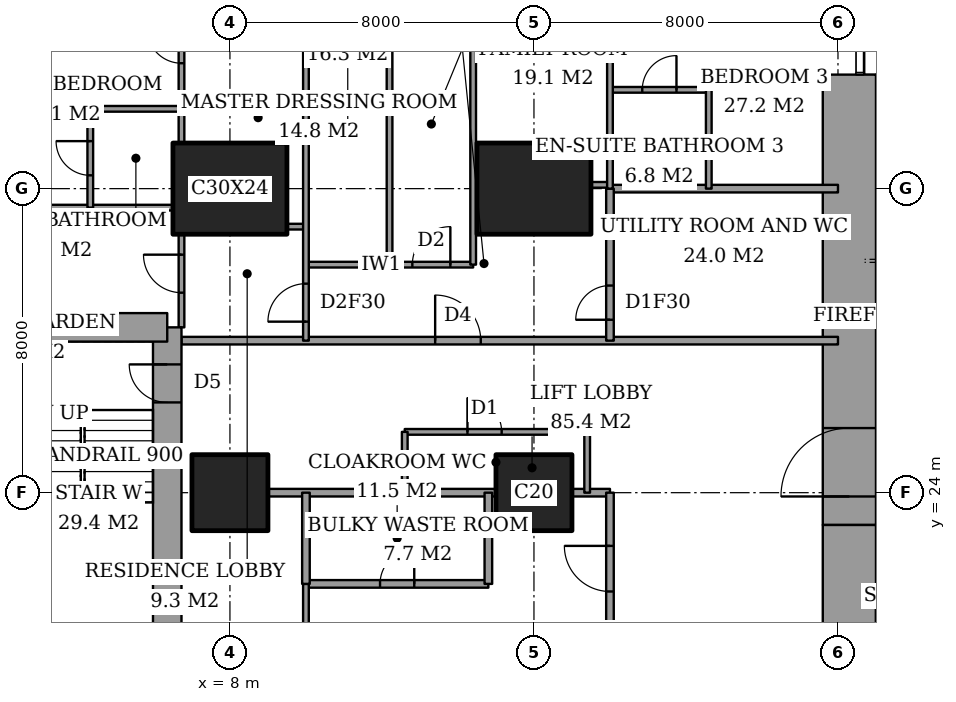
"""IFC4 building model, lengths in metres.
Left out: names, types, materials, properties, quantities, classifications, styles, units other than length and angle.
Written with IfcOpenShell. Run it as: python <this file> out.ifc"""

import sys

from ifc_helpers import new_model, si_unit, direction, frame, frame_2d, origin, origin_2d, place, context, subcontext, project, spatial, rectangle, extrude, element, fill, save


model = new_model("IFC4")
c1 = context("Model", 3, precision=1e-05, world=origin(), true_north=direction((0.0, 1.0)))
c2 = subcontext(c1, "Body", "Model", "MODEL_VIEW")
j1 = project(units=[si_unit("LENGTHUNIT", "METRE"), si_unit("PLANEANGLEUNIT", "RADIAN")], contexts=[c1])
p1 = place(None, origin())
s1 = spatial("IfcSite", under=j1, at=p1, CompositionType="ELEMENT")
p2 = place(p1, origin())
s2 = spatial("IfcBuilding", under=s1, at=p2, CompositionType="ELEMENT")
p3 = place(p2, frame((0.0, 0.0, 157.4)))
s3 = spatial("IfcBuildingStorey", under=s2, at=p3, CompositionType="ELEMENT", Elevation=157.4)
p4 = place(p3, frame((8.0, 24.0, 0.0), z_axis=(0.0, 0.0, 1.0), x_axis=(1.0, 0.0, 0.0)))
e1 = element("IfcColumn", 1, at=p4, inside=s3, PredefinedType="COLUMN", context=c2, shape_type="SweptSolid", body=[
    extrude(rectangle(XDim=2.0, YDim=2.0, at=origin_2d()), origin(), (0.0, 0.0, 1.0), 3.6),
])
p5 = place(p3, frame((8.0, 32.0, 0.0), z_axis=(0.0, 0.0, 1.0), x_axis=(1.0, 0.0, 0.0)))
e2 = element("IfcColumn", 2, at=p5, inside=s3, PredefinedType="COLUMN", context=c2, shape_type="SweptSolid", body=[
    extrude(rectangle(XDim=3.0, YDim=2.4, at=origin_2d()), origin(), (0.0, 0.0, 1.0), 3.6),
])
p6 = place(p3, frame((16.0, 24.0, 0.0), z_axis=(0.0, 0.0, 1.0), x_axis=(1.0, 0.0, 0.0)))
e3 = element("IfcColumn", 3, at=p6, inside=s3, PredefinedType="COLUMN", context=c2, shape_type="SweptSolid", body=[
    extrude(rectangle(XDim=2.0, YDim=2.0, at=origin_2d()), origin(), (0.0, 0.0, 1.0), 3.6),
])
p7 = place(p3, frame((16.0, 32.0, 0.0), z_axis=(0.0, 0.0, 1.0), x_axis=(1.0, 0.0, 0.0)))
e4 = element("IfcColumn", 4, at=p7, inside=s3, PredefinedType="COLUMN", context=c2, shape_type="SweptSolid", body=[
    extrude(rectangle(XDim=3.0, YDim=2.4, at=origin_2d()), origin(), (0.0, 0.0, 1.0), 3.6),
])
p8 = place(p3, frame((24.3, 13.0, 0.0), z_axis=(0.0, 0.0, 1.0), x_axis=(0.0, 1.0, 0.0)))
e5 = element("IfcWall", 5, at=p8, inside=s3, PredefinedType="SHEAR", context=c2, shape_type="SweptSolid", body=[
    extrude(rectangle(XDim=10.15, YDim=1.4, at=frame_2d((5.075, 0.0))), origin(), (0.0, 0.0, 1.0), 3.6),
])
p9 = place(p3, frame((24.3, 23.15, 0.0), z_axis=(0.0, 0.0, 1.0), x_axis=(0.0, 1.0, 0.0)))
e6 = element("IfcWall", 6, at=p9, inside=s3, PredefinedType="SHEAR", context=c2, shape_type="SweptSolid", body=[
    extrude(rectangle(XDim=11.85, YDim=1.4, at=frame_2d((5.925, 0.0))), origin(), (0.0, 0.0, 1.0), 3.6),
])
p10 = place(p9, frame((0.75, 0.0, 0.0)))
e7 = element("IfcOpeningElement", 7, at=p10, cuts=e6, PredefinedType="OPENING", context=c2, shape_type="SweptSolid", body=[
    extrude(rectangle(XDim=1.8, YDim=2.4, at=frame_2d((0.9, 1.2))), frame((0.0, 0.71, 0.0), z_axis=(0.0, -1.0, 0.0), x_axis=(1.0, 0.0, 0.0)), (0.0, 0.0, 1.0), 1.42),
])
p11 = place(p3, frame((6.35, 19.65, 0.0), z_axis=(0.0, 0.0, 1.0), x_axis=(0.0, 1.0, 0.0)))
e8 = element("IfcWall", 8, at=p11, inside=s3, PredefinedType="SHEAR", context=c2, shape_type="SweptSolid", body=[
    extrude(rectangle(XDim=8.7, YDim=0.75, at=frame_2d((4.35, 0.0))), origin(), (0.0, 0.0, 1.0), 3.6),
])
p12 = place(p11, frame((6.725, 0.0, 0.0)))
e9 = element("IfcOpeningElement", 9, at=p12, cuts=e8, PredefinedType="OPENING", context=c2, shape_type="SweptSolid", body=[
    extrude(rectangle(XDim=1.0, YDim=2.1, at=frame_2d((0.5, 1.05))), frame((0.0, 0.385, 0.0), z_axis=(0.0, -1.0, 0.0), x_axis=(1.0, 0.0, 0.0)), (0.0, 0.0, 1.0), 0.77),
])
p13 = place(p3, frame((6.35, 28.35, 0.0), z_axis=(0.0, 0.0, 1.0), x_axis=(-1.0, 0.0, 0.0)))
e10 = element("IfcWall", 10, at=p13, inside=s3, PredefinedType="SHEAR", context=c2, shape_type="SweptSolid", body=[
    extrude(rectangle(XDim=4.45, YDim=0.75, at=frame_2d((2.225, 0.0))), origin(), (0.0, 0.0, 1.0), 3.6),
])
p14 = place(p3, frame((10.0, 21.6, 0.0), z_axis=(0.0, 0.0, 1.0), x_axis=(1.0, 0.0, 0.0)))
e11 = element("IfcWall", 11, at=p14, inside=s3, PredefinedType="PARTITIONING", context=c2, shape_type="SweptSolid", body=[
    extrude(rectangle(XDim=4.8, YDim=0.2, at=frame_2d((2.4, 0.0))), origin(), (0.0, 0.0, 1.0), 3.35),
])
p15 = place(p14, frame((1.95, 0.0, 0.0)))
e12 = element("IfcOpeningElement", 12, at=p15, cuts=e11, PredefinedType="OPENING", context=c2, shape_type="SweptSolid", body=[
    extrude(rectangle(XDim=0.9, YDim=2.1, at=frame_2d((0.45, 1.05))), frame((0.0, 0.11, 0.0), z_axis=(0.0, -1.0, 0.0), x_axis=(1.0, 0.0, 0.0)), (0.0, 0.0, 1.0), 0.22),
])
p16 = place(p3, frame((9.0, 24.0, 0.0), z_axis=(0.0, 0.0, 1.0), x_axis=(1.0, 0.0, 0.0)))
e13 = element("IfcWall", 13, at=p16, inside=s3, PredefinedType="PARTITIONING", context=c2, shape_type="SweptSolid", body=[
    extrude(rectangle(XDim=6.0, YDim=0.2, at=frame_2d((3.0, 0.0))), origin(), (0.0, 0.0, 1.0), 3.35),
])
p17 = place(p3, frame((17.0, 24.0, 0.0), z_axis=(0.0, 0.0, 1.0), x_axis=(1.0, 0.0, 0.0)))
e14 = element("IfcWall", 14, at=p17, inside=s3, PredefinedType="PARTITIONING", context=c2, shape_type="SweptSolid", body=[
    extrude(rectangle(XDim=1.0, YDim=0.2, at=frame_2d((0.5, 0.0))), origin(), (0.0, 0.0, 1.0), 3.35),
])
p18 = place(p3, frame((12.6, 25.6, 0.0), z_axis=(0.0, 0.0, 1.0), x_axis=(1.0, 0.0, 0.0)))
e15 = element("IfcWall", 15, at=p18, inside=s3, PredefinedType="PARTITIONING", context=c2, shape_type="SweptSolid", body=[
    extrude(rectangle(XDim=4.8, YDim=0.15, at=frame_2d((2.4, 0.0))), origin(), (0.0, 0.0, 1.0), 3.35),
])
p19 = place(p18, frame((1.65, 0.0, 0.0)))
e16 = element("IfcOpeningElement", 16, at=p19, cuts=e15, PredefinedType="OPENING", context=c2, shape_type="SweptSolid", body=[
    extrude(rectangle(XDim=0.9, YDim=2.1, at=frame_2d((0.45, 1.05))), frame((0.0, 0.085, 0.0), z_axis=(0.0, -1.0, 0.0), x_axis=(1.0, 0.0, 0.0)), (0.0, 0.0, 1.0), 0.17),
])
p20 = place(p3, frame((6.725, 28.0, 0.0), z_axis=(0.0, 0.0, 1.0), x_axis=(1.0, 0.0, 0.0)))
e17 = element("IfcWall", 17, at=p20, inside=s3, PredefinedType="PARTITIONING", context=c2, shape_type="SweptSolid", body=[
    extrude(rectangle(XDim=17.275, YDim=0.2, at=frame_2d((8.637, 0.0))), origin(), (0.0, 0.0, 1.0), 3.35),
])
p21 = place(p20, frame((6.675, 0.0, 0.0)))
e18 = element("IfcOpeningElement", 18, at=p21, cuts=e17, PredefinedType="OPENING", context=c2, shape_type="SweptSolid", body=[
    extrude(rectangle(XDim=1.2, YDim=2.4, at=frame_2d((0.6, 1.2))), frame((0.0, 0.11, 0.0), z_axis=(0.0, -1.0, 0.0), x_axis=(1.0, 0.0, 0.0)), (0.0, 0.0, 1.0), 0.22),
])
p22 = place(p3, frame((10.0, 30.0, 0.0), z_axis=(0.0, 0.0, 1.0), x_axis=(1.0, 0.0, 0.0)))
e19 = element("IfcWall", 19, at=p22, inside=s3, PredefinedType="PARTITIONING", context=c2, shape_type="SweptSolid", body=[
    extrude(rectangle(XDim=4.4, YDim=0.15, at=frame_2d((2.2, 0.0))), origin(), (0.0, 0.0, 1.0), 3.35),
])
p23 = place(p22, frame((2.8, 0.0, 0.0)))
e20 = element("IfcOpeningElement", 20, at=p23, cuts=e19, PredefinedType="OPENING", context=c2, shape_type="SweptSolid", body=[
    extrude(rectangle(XDim=1.0, YDim=2.1, at=frame_2d((0.5, 1.05))), frame((0.0, 0.085, 0.0), z_axis=(0.0, -1.0, 0.0), x_axis=(1.0, 0.0, 0.0)), (0.0, 0.0, 1.0), 0.17),
])
p24 = place(p3, frame((9.5, 31.0, 0.0), z_axis=(0.0, 0.0, 1.0), x_axis=(1.0, 0.0, 0.0)))
e21 = element("IfcWall", 21, at=p24, inside=s3, PredefinedType="PARTITIONING", context=c2, shape_type="SweptSolid", body=[
    extrude(rectangle(XDim=0.5, YDim=0.15, at=frame_2d((0.25, 0.0))), origin(), (0.0, 0.0, 1.0), 3.35),
])
p25 = place(p3, frame((1.35, 31.5, 0.0), z_axis=(0.0, 0.0, 1.0), x_axis=(1.0, 0.0, 0.0)))
e22 = element("IfcWall", 22, at=p25, inside=s3, PredefinedType="PARTITIONING", context=c2, shape_type="SweptSolid", body=[
    extrude(rectangle(XDim=5.15, YDim=0.15, at=frame_2d((2.575, 0.0))), origin(), (0.0, 0.0, 1.0), 3.35),
])
p26 = place(p3, frame((18.0, 32.0, 0.0), z_axis=(0.0, 0.0, 1.0), x_axis=(1.0, 0.0, 0.0)))
e23 = element("IfcWall", 23, at=p26, inside=s3, PredefinedType="PARTITIONING", context=c2, shape_type="SweptSolid", body=[
    extrude(rectangle(XDim=6.0, YDim=0.2, at=frame_2d((3.0, 0.0))), origin(), (0.0, 0.0, 1.0), 2.634),
])
p27 = place(p3, frame((17.5, 32.1, 0.0), z_axis=(0.0, 0.0, 1.0), x_axis=(1.0, 0.0, 0.0)))
e24 = element("IfcWall", 24, at=p27, inside=s3, PredefinedType="PARTITIONING", context=c2, shape_type="SweptSolid", body=[
    extrude(rectangle(XDim=0.5, YDim=0.15, at=frame_2d((0.25, 0.0))), origin(), (0.0, 0.0, 1.0), 2.634),
])
p28 = place(p3, frame((4.325, 34.1, 0.0), z_axis=(0.0, 0.0, 1.0), x_axis=(1.0, 0.0, 0.0)))
e25 = element("IfcWall", 25, at=p28, inside=s3, PredefinedType="PARTITIONING", context=c2, shape_type="SweptSolid", body=[
    extrude(rectangle(XDim=2.4, YDim=0.15, at=frame_2d((1.2, 0.0))), origin(), (0.0, 0.0, 1.0), 3.35),
])
p29 = place(p3, frame((18.0, 34.6, 0.0), z_axis=(0.0, 0.0, 1.0), x_axis=(1.0, 0.0, 0.0)))
e26 = element("IfcWall", 26, at=p29, inside=s3, PredefinedType="PARTITIONING", context=c2, shape_type="SweptSolid", body=[
    extrude(rectangle(XDim=2.6, YDim=0.15, at=frame_2d((1.3, 0.0))), origin(), (0.0, 0.0, 1.0), 3.35),
])
p30 = place(p29, frame((0.85, 0.0, 0.0)))
e27 = element("IfcOpeningElement", 27, at=p30, cuts=e26, PredefinedType="OPENING", context=c2, shape_type="SweptSolid", body=[
    extrude(rectangle(XDim=0.9, YDim=2.1, at=frame_2d((0.45, 1.05))), frame((0.0, 0.085, 0.0), z_axis=(0.0, -1.0, 0.0), x_axis=(1.0, 0.0, 0.0)), (0.0, 0.0, 1.0), 0.17),
])
p31 = place(p3, frame((4.325, 31.5, 0.0), z_axis=(0.0, 0.0, 1.0), x_axis=(0.0, 1.0, 0.0)))
e28 = element("IfcWall", 28, at=p31, inside=s3, PredefinedType="PARTITIONING", context=c2, shape_type="SweptSolid", body=[
    extrude(rectangle(XDim=2.6, YDim=0.15, at=frame_2d((1.3, 0.0))), origin(), (0.0, 0.0, 1.0), 3.35),
])
p32 = place(p31, frame((0.85, 0.0, 0.0)))
e29 = element("IfcOpeningElement", 29, at=p32, cuts=e28, PredefinedType="OPENING", context=c2, shape_type="SweptSolid", body=[
    extrude(rectangle(XDim=0.9, YDim=2.1, at=frame_2d((0.45, 1.05))), frame((0.0, 0.085, 0.0), z_axis=(0.0, -1.0, 0.0), x_axis=(1.0, 0.0, 0.0)), (0.0, 0.0, 1.0), 0.17),
])
p33 = place(p3, frame((6.725, 28.35, 0.0), z_axis=(0.0, 0.0, 1.0), x_axis=(0.0, 1.0, 0.0)))
e30 = element("IfcWall", 30, at=p33, inside=s3, PredefinedType="PARTITIONING", context=c2, shape_type="SweptSolid", body=[
    extrude(rectangle(XDim=2.45, YDim=0.15, at=frame_2d((1.225, 0.0))), origin(), (0.0, 0.0, 1.0), 3.35),
])
p34 = place(p33, frame((0.913, 0.0, 0.0)))
e31 = element("IfcOpeningElement", 31, at=p34, cuts=e30, PredefinedType="OPENING", context=c2, shape_type="SweptSolid", body=[
    extrude(rectangle(XDim=1.0, YDim=2.1, at=frame_2d((0.5, 1.05))), frame((0.0, 0.085, 0.0), z_axis=(0.0, -1.0, 0.0), x_axis=(1.0, 0.0, 0.0)), (0.0, 0.0, 1.0), 0.17),
])
p35 = place(p3, frame((6.725, 33.2, 0.0), z_axis=(0.0, 0.0, 1.0), x_axis=(0.0, 1.0, 0.0)))
e32 = element("IfcWall", 32, at=p35, inside=s3, PredefinedType="PARTITIONING", context=c2, shape_type="SweptSolid", body=[
    extrude(rectangle(XDim=4.2, YDim=0.15, at=frame_2d((2.1, 0.0))), origin(), (0.0, 0.0, 1.0), 3.35),
])
p36 = place(p35, frame((2.1, 0.0, 0.0)))
e33 = element("IfcOpeningElement", 33, at=p36, cuts=e32, PredefinedType="OPENING", context=c2, shape_type="SweptSolid", body=[
    extrude(rectangle(XDim=0.9, YDim=2.1, at=frame_2d((0.45, 1.05))), frame((0.0, 0.085, 0.0), z_axis=(0.0, -1.0, 0.0), x_axis=(1.0, 0.0, 0.0)), (0.0, 0.0, 1.0), 0.17),
])
p37 = place(p3, frame((10.0, 21.6, 0.0), z_axis=(0.0, 0.0, 1.0), x_axis=(0.0, 1.0, 0.0)))
e34 = element("IfcWall", 34, at=p37, inside=s3, PredefinedType="PARTITIONING", context=c2, shape_type="SweptSolid", body=[
    extrude(rectangle(XDim=2.4, YDim=0.2, at=frame_2d((1.2, 0.0))), origin(), (0.0, 0.0, 1.0), 3.35),
])
p38 = place(p3, frame((10.0, 14.0, 0.0), z_axis=(0.0, 0.0, 1.0), x_axis=(0.0, 1.0, 0.0)))
e35 = element("IfcWall", 35, at=p38, inside=s3, PredefinedType="PARTITIONING", context=c2, shape_type="SweptSolid", body=[
    extrude(rectangle(XDim=7.6, YDim=0.15, at=frame_2d((3.8, 0.0))), origin(), (0.0, 0.0, 1.0), 3.35),
])
p39 = place(p38, frame((4.8, 0.0, 0.0)))
e36 = element("IfcOpeningElement", 36, at=p39, cuts=e35, PredefinedType="OPENING", context=c2, shape_type="SweptSolid", body=[
    extrude(rectangle(XDim=1.0, YDim=2.1, at=frame_2d((0.5, 1.05))), frame((0.0, 0.085, 0.0), z_axis=(0.0, -1.0, 0.0), x_axis=(1.0, 0.0, 0.0)), (0.0, 0.0, 1.0), 0.17),
])
p40 = place(p3, frame((10.0, 28.0, 0.0), z_axis=(0.0, 0.0, 1.0), x_axis=(0.0, 1.0, 0.0)))
e37 = element("IfcWall", 37, at=p40, inside=s3, PredefinedType="PARTITIONING", context=c2, shape_type="SweptSolid", body=[
    extrude(rectangle(XDim=9.4, YDim=0.15, at=frame_2d((4.7, 0.0))), origin(), (0.0, 0.0, 1.0), 3.35),
])
p41 = place(p40, frame((0.5, 0.0, 0.0)))
e38 = element("IfcOpeningElement", 38, at=p41, cuts=e37, PredefinedType="OPENING", context=c2, shape_type="SweptSolid", body=[
    extrude(rectangle(XDim=1.0, YDim=2.1, at=frame_2d((0.5, 1.05))), frame((0.0, 0.085, 0.0), z_axis=(0.0, -1.0, 0.0), x_axis=(1.0, 0.0, 0.0)), (0.0, 0.0, 1.0), 0.17),
])
p42 = place(p3, frame((12.2, 30.0, 0.0), z_axis=(0.0, 0.0, 1.0), x_axis=(0.0, 1.0, 0.0)))
e39 = element("IfcWall", 39, at=p42, inside=s3, PredefinedType="PARTITIONING", context=c2, shape_type="SweptSolid", body=[
    extrude(rectangle(XDim=7.4, YDim=0.15, at=frame_2d((3.7, 0.0))), origin(), (0.0, 0.0, 1.0), 3.35),
])
p43 = place(p3, frame((12.6, 24.0, 0.0), z_axis=(0.0, 0.0, 1.0), x_axis=(0.0, 1.0, 0.0)))
e40 = element("IfcWall", 40, at=p43, inside=s3, PredefinedType="PARTITIONING", context=c2, shape_type="SweptSolid", body=[
    extrude(rectangle(XDim=1.6, YDim=0.15, at=frame_2d((0.8, 0.0))), origin(), (0.0, 0.0, 1.0), 3.35),
])
p44 = place(p3, frame((14.4, 30.0, 0.0), z_axis=(0.0, 0.0, 1.0), x_axis=(0.0, 1.0, 0.0)))
e41 = element("IfcWall", 41, at=p44, inside=s3, PredefinedType="PARTITIONING", context=c2, shape_type="SweptSolid", body=[
    extrude(rectangle(XDim=7.4, YDim=0.15, at=frame_2d((3.7, 0.0))), origin(), (0.0, 0.0, 1.0), 3.35),
])
p45 = place(p3, frame((14.8, 21.6, 0.0), z_axis=(0.0, 0.0, 1.0), x_axis=(0.0, 1.0, 0.0)))
e42 = element("IfcWall", 42, at=p45, inside=s3, PredefinedType="PARTITIONING", context=c2, shape_type="SweptSolid", body=[
    extrude(rectangle(XDim=2.4, YDim=0.2, at=frame_2d((1.2, 0.0))), origin(), (0.0, 0.0, 1.0), 3.35),
])
p46 = place(p3, frame((17.4, 24.0, 0.0), z_axis=(0.0, 0.0, 1.0), x_axis=(0.0, 1.0, 0.0)))
e43 = element("IfcWall", 43, at=p46, inside=s3, PredefinedType="PARTITIONING", context=c2, shape_type="SweptSolid", body=[
    extrude(rectangle(XDim=1.6, YDim=0.15, at=frame_2d((0.8, 0.0))), origin(), (0.0, 0.0, 1.0), 3.35),
])
p47 = place(p3, frame((18.0, 17.0, 0.0), z_axis=(0.0, 0.0, 1.0), x_axis=(0.0, 1.0, 0.0)))
e44 = element("IfcWall", 44, at=p47, inside=s3, PredefinedType="PARTITIONING", context=c2, shape_type="SweptSolid", body=[
    extrude(rectangle(XDim=7.0, YDim=0.2, at=frame_2d((3.5, 0.0))), origin(), (0.0, 0.0, 1.0), 3.35),
])
p48 = place(p47, frame((4.4, 0.0, 0.0)))
e45 = element("IfcOpeningElement", 45, at=p48, cuts=e44, PredefinedType="OPENING", context=c2, shape_type="SweptSolid", body=[
    extrude(rectangle(XDim=1.2, YDim=2.4, at=frame_2d((0.6, 1.2))), frame((0.0, 0.11, 0.0), z_axis=(0.0, -1.0, 0.0), x_axis=(1.0, 0.0, 0.0)), (0.0, 0.0, 1.0), 0.22),
])
p49 = place(p47, frame((1.05, 0.0, 0.0)))
e46 = element("IfcOpeningElement", 46, at=p49, cuts=e44, PredefinedType="OPENING", context=c2, shape_type="SweptSolid", body=[
    extrude(rectangle(XDim=0.9, YDim=2.1, at=frame_2d((0.45, 1.05))), frame((0.0, 0.11, 0.0), z_axis=(0.0, -1.0, 0.0), x_axis=(1.0, 0.0, 0.0)), (0.0, 0.0, 1.0), 0.22),
])
p50 = place(p3, frame((18.0, 28.0, 0.0), z_axis=(0.0, 0.0, 1.0), x_axis=(0.0, 1.0, 0.0)))
e47 = element("IfcWall", 47, at=p50, inside=s3, PredefinedType="PARTITIONING", context=c2, shape_type="SweptSolid", body=[
    extrude(rectangle(XDim=4.0, YDim=0.2, at=frame_2d((2.0, 0.0))), origin(), (0.0, 0.0, 1.0), 3.35),
])
p51 = place(p50, frame((0.55, 0.0, 0.0)))
e48 = element("IfcOpeningElement", 48, at=p51, cuts=e47, PredefinedType="OPENING", context=c2, shape_type="SweptSolid", body=[
    extrude(rectangle(XDim=0.9, YDim=2.1, at=frame_2d((0.45, 1.05))), frame((0.0, 0.11, 0.0), z_axis=(0.0, -1.0, 0.0), x_axis=(1.0, 0.0, 0.0)), (0.0, 0.0, 1.0), 0.22),
])
p52 = place(p3, frame((18.0, 32.0, 0.0), z_axis=(0.0, 0.0, 1.0), x_axis=(0.0, 1.0, 0.0)))
e49 = element("IfcWall", 49, at=p52, inside=s3, PredefinedType="PARTITIONING", context=c2, shape_type="SweptSolid", body=[
    extrude(rectangle(XDim=5.4, YDim=0.15, at=frame_2d((2.7, 0.0))), origin(), (0.0, 0.0, 1.0), 3.35),
])
p53 = place(p3, frame((20.6, 32.0, 0.0), z_axis=(0.0, 0.0, 1.0), x_axis=(0.0, 1.0, 0.0)))
e50 = element("IfcWall", 50, at=p53, inside=s3, PredefinedType="PARTITIONING", context=c2, shape_type="SweptSolid", body=[
    extrude(rectangle(XDim=2.6, YDim=0.15, at=frame_2d((1.3, 0.0))), origin(), (0.0, 0.0, 1.0), 3.35),
])
p54 = place(p15, origin())
e51 = element("IfcDoor", 51, at=p54, inside=s3, OperationType="SINGLE_SWING_LEFT", PredefinedType="DOOR", context=c2, shape_type="SweptSolid", body=[
    extrude(rectangle(XDim=0.9, YDim=2.1, at=frame_2d((0.45, 1.05))), frame((0.0, 0.025, 0.0), z_axis=(0.0, -1.0, 0.0), x_axis=(1.0, 0.0, 0.0)), (0.0, 0.0, 1.0), 0.05),
])
fill(e12, e51)
p55 = place(p48, origin())
e52 = element("IfcDoor", 52, at=p55, inside=s3, OperationType="SINGLE_SWING_LEFT", PredefinedType="DOOR", context=c2, shape_type="SweptSolid", body=[
    extrude(rectangle(XDim=1.2, YDim=2.4, at=frame_2d((0.6, 1.2))), frame((0.0, 0.025, 0.0), z_axis=(0.0, -1.0, 0.0), x_axis=(1.0, 0.0, 0.0)), (0.0, 0.0, 1.0), 0.05),
])
fill(e45, e52)
p56 = place(p32, origin())
e53 = element("IfcDoor", 53, at=p56, inside=s3, OperationType="SINGLE_SWING_LEFT", PredefinedType="DOOR", context=c2, shape_type="SweptSolid", body=[
    extrude(rectangle(XDim=0.9, YDim=2.1, at=frame_2d((0.45, 1.05))), frame((0.0, 0.025, 0.0), z_axis=(0.0, -1.0, 0.0), x_axis=(1.0, 0.0, 0.0)), (0.0, 0.0, 1.0), 0.05),
])
fill(e29, e53)
p57 = place(p34, origin())
e54 = element("IfcDoor", 54, at=p57, inside=s3, OperationType="SINGLE_SWING_LEFT", PredefinedType="DOOR", context=c2, shape_type="SweptSolid", body=[
    extrude(rectangle(XDim=1.0, YDim=2.1, at=frame_2d((0.5, 1.05))), frame((0.0, 0.025, 0.0), z_axis=(0.0, -1.0, 0.0), x_axis=(1.0, 0.0, 0.0)), (0.0, 0.0, 1.0), 0.05),
])
fill(e31, e54)
p58 = place(p36, origin())
e55 = element("IfcDoor", 55, at=p58, inside=s3, OperationType="SINGLE_SWING_LEFT", PredefinedType="DOOR", context=c2, shape_type="SweptSolid", body=[
    extrude(rectangle(XDim=0.9, YDim=2.1, at=frame_2d((0.45, 1.05))), frame((0.0, 0.025, 0.0), z_axis=(0.0, -1.0, 0.0), x_axis=(1.0, 0.0, 0.0)), (0.0, 0.0, 1.0), 0.05),
])
fill(e33, e55)
p59 = place(p41, origin())
e56 = element("IfcDoor", 56, at=p59, inside=s3, OperationType="SINGLE_SWING_RIGHT", PredefinedType="DOOR", context=c2, shape_type="SweptSolid", body=[
    extrude(rectangle(XDim=1.0, YDim=2.1, at=frame_2d((0.5, 1.05))), frame((0.0, 0.025, 0.0), z_axis=(0.0, -1.0, 0.0), x_axis=(1.0, 0.0, 0.0)), (0.0, 0.0, 1.0), 0.05),
])
fill(e38, e56)
p60 = place(p21, origin())
e57 = element("IfcDoor", 57, at=p60, inside=s3, OperationType="SINGLE_SWING_RIGHT", PredefinedType="DOOR", context=c2, shape_type="SweptSolid", body=[
    extrude(rectangle(XDim=1.2, YDim=2.4, at=frame_2d((0.6, 1.2))), frame((0.0, 0.025, 0.0), z_axis=(0.0, -1.0, 0.0), x_axis=(1.0, 0.0, 0.0)), (0.0, 0.0, 1.0), 0.05),
])
fill(e18, e57)
p61 = place(p23, origin())
e58 = element("IfcDoor", 58, at=p61, inside=s3, OperationType="SINGLE_SWING_LEFT", PredefinedType="DOOR", context=c2, shape_type="SweptSolid", body=[
    extrude(rectangle(XDim=1.0, YDim=2.1, at=frame_2d((0.5, 1.05))), frame((0.0, 0.025, 0.0), z_axis=(0.0, -1.0, 0.0), x_axis=(1.0, 0.0, 0.0)), (0.0, 0.0, 1.0), 0.05),
])
fill(e20, e58)
p62 = place(p30, origin())
e59 = element("IfcDoor", 59, at=p62, inside=s3, OperationType="SINGLE_SWING_LEFT", PredefinedType="DOOR", context=c2, shape_type="SweptSolid", body=[
    extrude(rectangle(XDim=0.9, YDim=2.1, at=frame_2d((0.45, 1.05))), frame((0.0, 0.025, 0.0), z_axis=(0.0, -1.0, 0.0), x_axis=(1.0, 0.0, 0.0)), (0.0, 0.0, 1.0), 0.05),
])
fill(e27, e59)
p63 = place(p51, origin())
e60 = element("IfcDoor", 60, at=p63, inside=s3, OperationType="SINGLE_SWING_RIGHT", PredefinedType="DOOR", context=c2, shape_type="SweptSolid", body=[
    extrude(rectangle(XDim=0.9, YDim=2.1, at=frame_2d((0.45, 1.05))), frame((0.0, 0.025, 0.0), z_axis=(0.0, -1.0, 0.0), x_axis=(1.0, 0.0, 0.0)), (0.0, 0.0, 1.0), 0.05),
])
fill(e48, e60)
p64 = place(p19, origin())
e61 = element("IfcDoor", 61, at=p64, inside=s3, OperationType="SINGLE_SWING_RIGHT", PredefinedType="DOOR", context=c2, shape_type="SweptSolid", body=[
    extrude(rectangle(XDim=0.9, YDim=2.1, at=frame_2d((0.45, 1.05))), frame((0.0, 0.025, 0.0), z_axis=(0.0, -1.0, 0.0), x_axis=(1.0, 0.0, 0.0)), (0.0, 0.0, 1.0), 0.05),
])
fill(e16, e61)
p65 = place(p10, origin())
e62 = element("IfcDoor", 62, at=p65, inside=s3, OperationType="DOUBLE_DOOR_DOUBLE_SWING", PredefinedType="DOOR", context=c2, shape_type="SweptSolid", body=[
    extrude(rectangle(XDim=1.8, YDim=2.4, at=frame_2d((0.9, 1.2))), frame((0.0, 0.025, 0.0), z_axis=(0.0, -1.0, 0.0), x_axis=(1.0, 0.0, 0.0)), (0.0, 0.0, 1.0), 0.05),
])
fill(e7, e62)
p66 = place(p12, origin())
e63 = element("IfcDoor", 63, at=p66, inside=s3, OperationType="SINGLE_SWING_LEFT", PredefinedType="DOOR", context=c2, shape_type="SweptSolid", body=[
    extrude(rectangle(XDim=1.0, YDim=2.1, at=frame_2d((0.5, 1.05))), frame((0.0, 0.025, 0.0), z_axis=(0.0, -1.0, 0.0), x_axis=(1.0, 0.0, 0.0)), (0.0, 0.0, 1.0), 0.05),
])
fill(e9, e63)
save(model, sys.argv[1])
